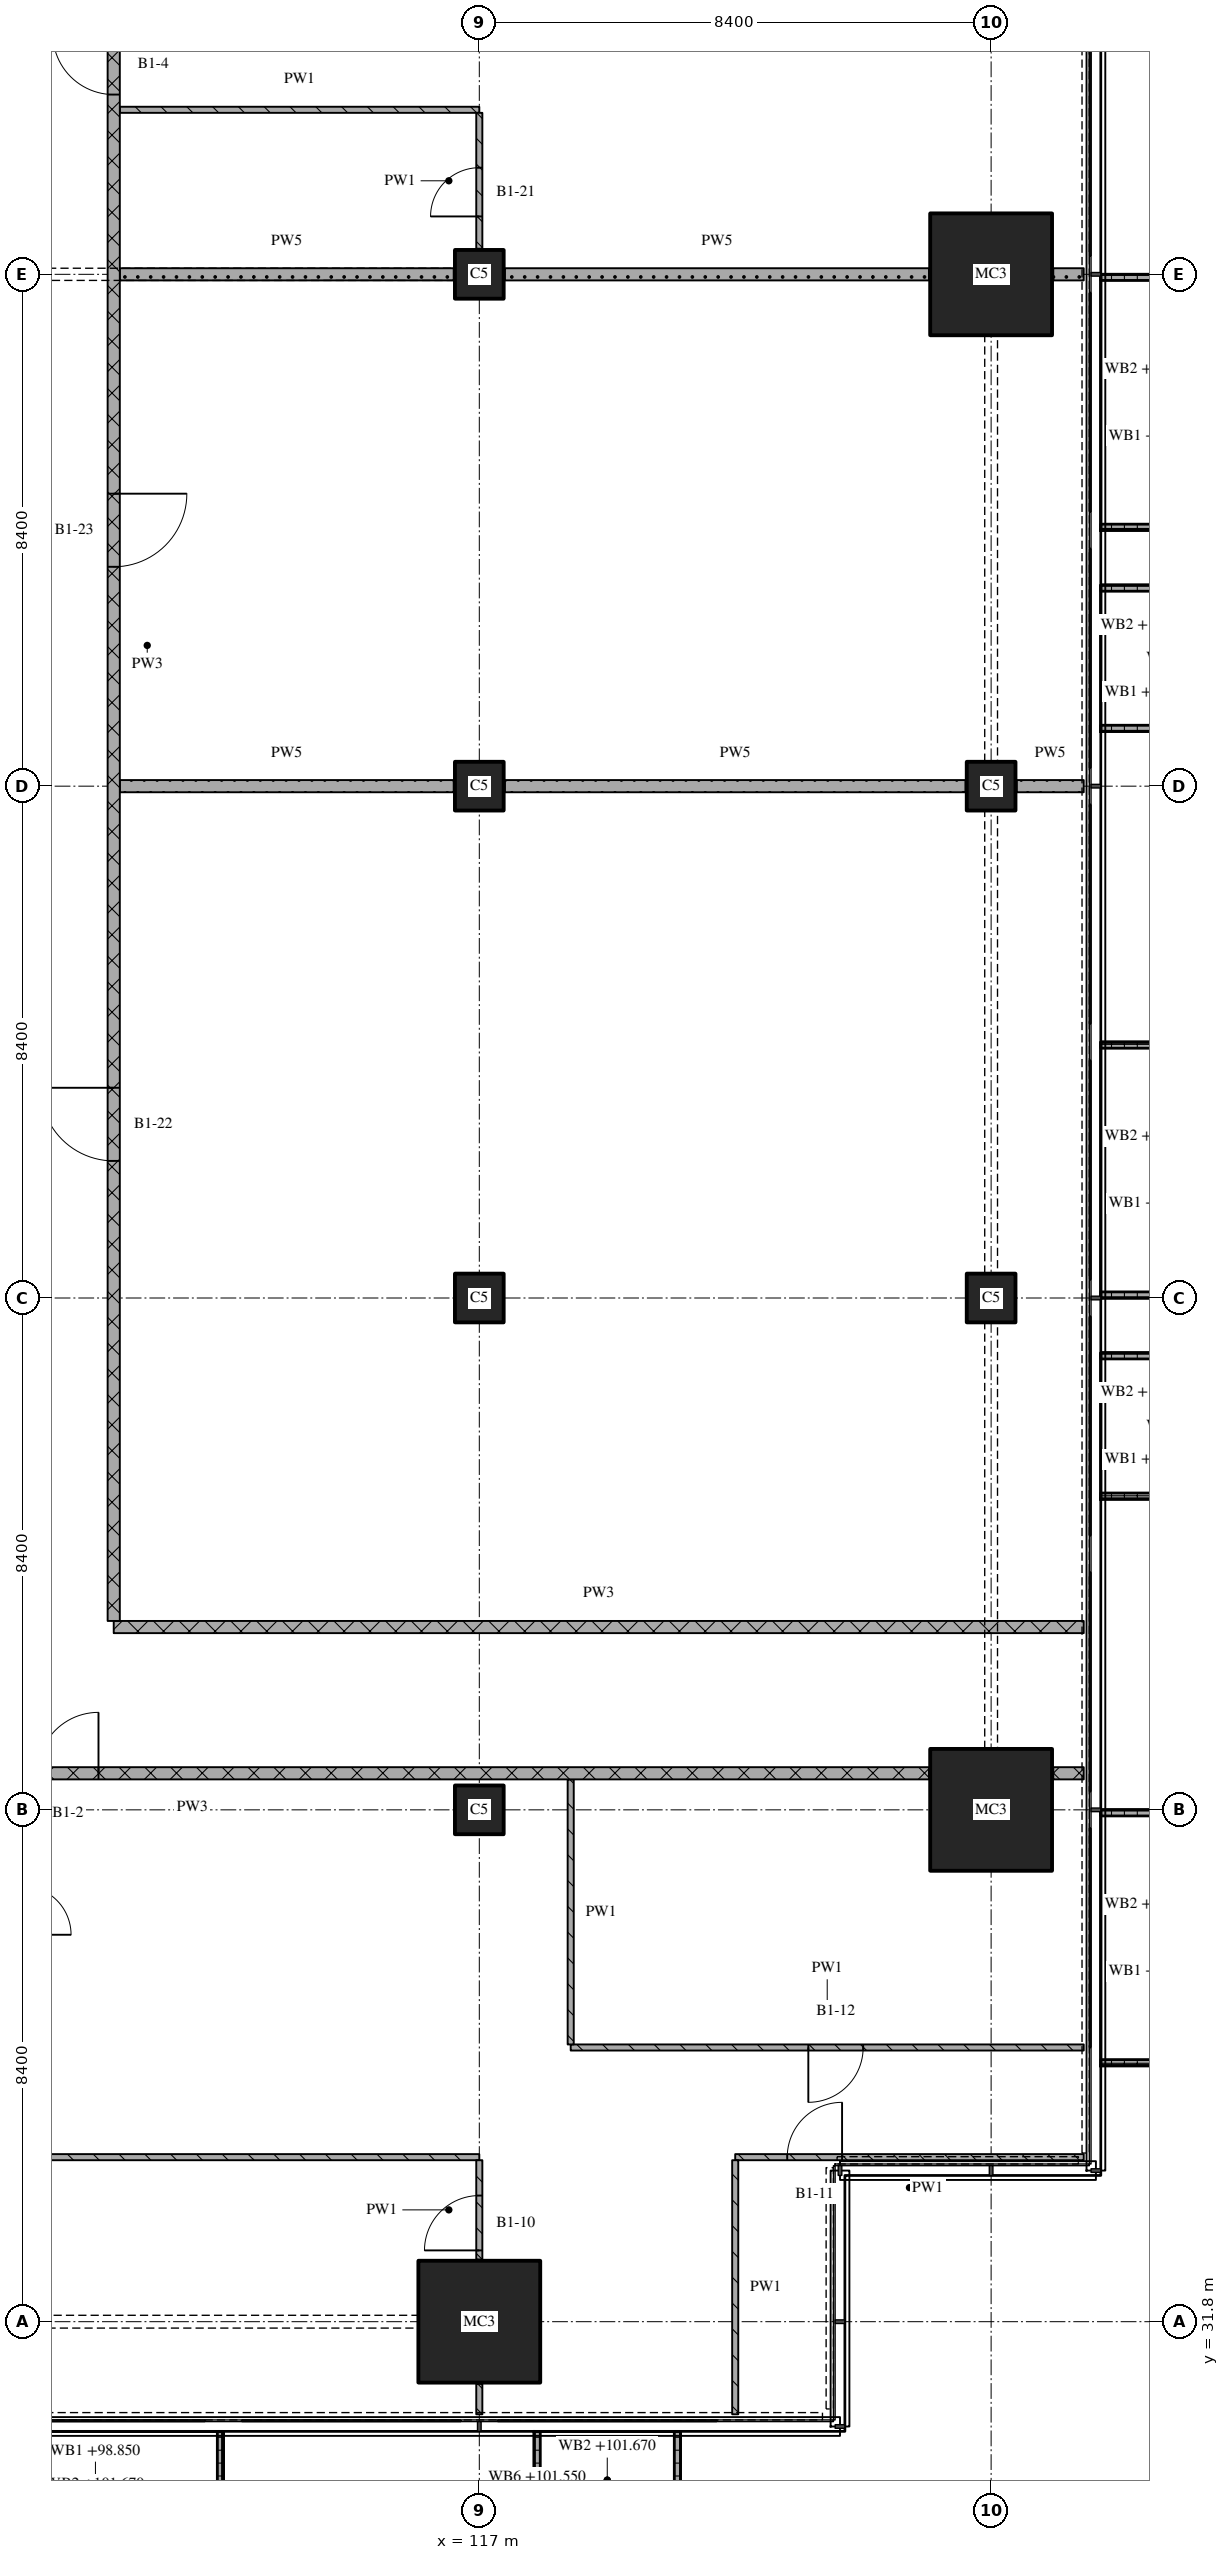
"""IFC4 building model, lengths in metres.
Left out: names, types, materials, properties, quantities, classifications, styles, units other than length and angle.
Written with IfcOpenShell. Run it as: python <this file> out.ifc"""

import sys

from ifc_helpers import new_model, si_unit, direction, frame, frame_2d, origin, origin_2d, place, context, subcontext, project, spatial, polyline, rectangle, outline, extrude, element, fill, save


model = new_model("IFC4")
c1 = context("Model", 3, precision=1e-05, world=origin(), true_north=direction((0.0, 1.0)))
c2 = subcontext(c1, "Body", "Model", "MODEL_VIEW")
j1 = project(units=[si_unit("LENGTHUNIT", "METRE"), si_unit("PLANEANGLEUNIT", "RADIAN")], contexts=[c1])
p1 = place(None, origin())
s1 = spatial("IfcSite", under=j1, at=p1, CompositionType="ELEMENT")
p2 = place(p1, origin())
s2 = spatial("IfcBuilding", under=s1, at=p2, CompositionType="ELEMENT")
p3 = place(p2, frame((0.0, 0.0, 98.85)))
s3 = spatial("IfcBuildingStorey", under=s2, at=p3, CompositionType="ELEMENT", Elevation=98.85)
p4 = place(p3, frame((117.0, 31.8, 0.0), z_axis=(0.0, 0.0, 1.0), x_axis=(1.0, 0.0, 0.0)))
e1 = element("IfcColumn", 1, at=p4, inside=s3, PredefinedType="COLUMN", context=c2, shape_type="SweptSolid", body=[
    extrude(rectangle(XDim=2.0, YDim=2.0, at=origin_2d()), origin(), (0.0, 0.0, 1.0), 3.6),
])
for number, where, z_axis, x_axis in (
    (2, (117.0, 40.2, 0.0), (0.0, 0.0, 1.0), (1.0, 0.0, 0.0)),
    (3, (117.0, 48.6, 0.0), (0.0, 0.0, 1.0), (1.0, 0.0, 0.0)),
    (4, (117.0, 57.0, 0.0), (0.0, 0.0, 1.0), (1.0, 0.0, 0.0)),
    (5, (117.0, 65.4, 0.0), (0.0, 0.0, 1.0), (1.0, 0.0, 0.0)),
):
    element("IfcColumn", number, at=place(p3, frame(where, z_axis=z_axis, x_axis=x_axis)), inside=s3, PredefinedType="COLUMN", context=c2, shape_type="SweptSolid", body=[
        extrude(rectangle(XDim=0.8, YDim=0.8, at=origin_2d()), origin(), (0.0, 0.0, 1.0), 3.6),
    ])
p5 = place(p3, frame((125.4, 40.2, 0.0), z_axis=(0.0, 0.0, 1.0), x_axis=(1.0, 0.0, 0.0)))
e6 = element("IfcColumn", 6, at=p5, inside=s3, PredefinedType="COLUMN", context=c2, shape_type="SweptSolid", body=[
    extrude(rectangle(XDim=2.0, YDim=2.0, at=origin_2d()), origin(), (0.0, 0.0, 1.0), 3.6),
])
for number, where, z_axis, x_axis in (
    (7, (125.4, 48.6, 0.0), (0.0, 0.0, 1.0), (1.0, 0.0, 0.0)),
    (8, (125.4, 57.0, 0.0), (0.0, 0.0, 1.0), (1.0, 0.0, 0.0)),
):
    element("IfcColumn", number, at=place(p3, frame(where, z_axis=z_axis, x_axis=x_axis)), inside=s3, PredefinedType="COLUMN", context=c2, shape_type="SweptSolid", body=[
        extrude(rectangle(XDim=0.8, YDim=0.8, at=origin_2d()), origin(), (0.0, 0.0, 1.0), 3.6),
    ])
p6 = place(p3, frame((125.4, 65.4, 0.0), z_axis=(0.0, 0.0, 1.0), x_axis=(1.0, 0.0, 0.0)))
e9 = element("IfcColumn", 9, at=p6, inside=s3, PredefinedType="COLUMN", context=c2, shape_type="SweptSolid", body=[
    extrude(rectangle(XDim=2.0, YDim=2.0, at=origin_2d()), origin(), (0.0, 0.0, 1.0), 3.6),
])
p7 = place(p3, origin())
e10 = element("IfcWall", 10, at=p7, inside=s3, PredefinedType="SOLIDWALL", context=c2, shape_type="SweptSolid", body=[
    extrude(outline(polyline([(108.6, 30.0), (108.7, 30.0), (108.7, 28.367), (112.7, 28.367), (112.7, 30.0), (112.8, 30.0), (112.8, 28.267), (108.6, 28.267), (108.6, 30.0)])), origin(), (0.0, 0.0, 1.0), 1.0),
])
p8 = place(p3, origin())
e11 = element("IfcWall", 11, at=p8, inside=s3, PredefinedType="SOLIDWALL", context=c2, shape_type="SweptSolid", body=[
    extrude(outline(polyline([(117.9, 30.0), (118.0, 30.0), (118.0, 28.5), (120.2, 28.5), (120.2, 30.0), (120.3, 30.0), (120.3, 28.4), (117.9, 28.4), (117.9, 30.0)])), origin(), (0.0, 0.0, 1.0), 1.0),
])
p9 = place(p3, origin())
e12 = element("IfcWall", 12, at=p9, inside=s3, PredefinedType="SOLIDWALL", context=c2, shape_type="SweptSolid", body=[
    extrude(outline(polyline([(127.2, 36.0), (127.2, 36.1), (128.833, 36.1), (128.833, 40.1), (127.2, 40.1), (127.2, 40.2), (128.933, 40.2), (128.933, 36.0), (127.2, 36.0)])), origin(), (0.0, 0.0, 1.0), 1.0),
])
p10 = place(p3, origin())
e13 = element("IfcWall", 13, at=p10, inside=s3, PredefinedType="SOLIDWALL", context=c2, shape_type="SweptSolid", body=[
    extrude(outline(polyline([(127.2, 45.3), (127.2, 45.4), (128.7, 45.4), (128.7, 47.6), (127.2, 47.6), (127.2, 47.7), (128.8, 47.7), (128.8, 45.3), (127.2, 45.3)])), origin(), (0.0, 0.0, 1.0), 1.0),
])
p11 = place(p3, origin())
e14 = element("IfcWall", 14, at=p11, inside=s3, PredefinedType="SOLIDWALL", context=c2, shape_type="SweptSolid", body=[
    extrude(outline(polyline([(127.2, 48.6), (127.2, 48.7), (128.833, 48.7), (128.833, 52.7), (127.2, 52.7), (127.2, 52.8), (128.933, 52.8), (128.933, 48.6), (127.2, 48.6)])), origin(), (0.0, 0.0, 1.0), 1.0),
])
p12 = place(p3, origin())
e15 = element("IfcWall", 15, at=p12, inside=s3, PredefinedType="SOLIDWALL", context=c2, shape_type="SweptSolid", body=[
    extrude(outline(polyline([(127.2, 57.9), (127.2, 58.0), (128.7, 58.0), (128.7, 60.2), (127.2, 60.2), (127.2, 60.3), (128.8, 60.3), (128.8, 57.9), (127.2, 57.9)])), origin(), (0.0, 0.0, 1.0), 1.0),
])
p13 = place(p3, origin())
e16 = element("IfcWall", 16, at=p13, inside=s3, PredefinedType="SOLIDWALL", context=c2, shape_type="SweptSolid", body=[
    extrude(outline(polyline([(127.2, 61.2), (127.2, 61.3), (128.833, 61.3), (128.833, 65.3), (127.2, 65.3), (127.2, 65.4), (128.933, 65.4), (128.933, 61.2), (127.2, 61.2)])), origin(), (0.0, 0.0, 1.0), 1.0),
])
p14 = place(p3, frame((117.0, 34.5, 0.0), z_axis=(0.0, 0.0, 1.0), x_axis=(-1.0, 0.0, 0.0)))
e17 = element("IfcWall", 17, at=p14, inside=s3, PredefinedType="PARTITIONING", context=c2, shape_type="SweptSolid", body=[
    extrude(rectangle(XDim=16.7, YDim=0.1, at=frame_2d((8.35, 0.0))), origin(), (0.0, 0.0, 1.0), 3.32),
])
p15 = place(p14, frame((12.15, 0.0, 0.0)))
e18 = element("IfcOpeningElement", 18, at=p15, cuts=e17, PredefinedType="OPENING", context=c2, shape_type="SweptSolid", body=[
    extrude(rectangle(XDim=0.9, YDim=2.1, at=frame_2d((0.45, 1.05))), frame((0.0, 0.06, 0.0), z_axis=(0.0, -1.0, 0.0), x_axis=(1.0, 0.0, 0.0)), (0.0, 0.0, 1.0), 0.12),
])
p16 = place(p3, frame((126.92, 34.5, 0.0), z_axis=(0.0, 0.0, 1.0), x_axis=(-1.0, 0.0, 0.0)))
e19 = element("IfcWall", 19, at=p16, inside=s3, PredefinedType="PARTITIONING", context=c2, shape_type="SweptSolid", body=[
    extrude(rectangle(XDim=5.72, YDim=0.1, at=frame_2d((2.86, 0.0))), origin(), (0.0, 0.0, 1.0), 3.32),
])
p17 = place(p16, frame((3.966, 0.0, 0.0)))
e20 = element("IfcOpeningElement", 20, at=p17, cuts=e19, PredefinedType="OPENING", context=c2, shape_type="SweptSolid", body=[
    extrude(rectangle(XDim=0.9, YDim=2.1, at=frame_2d((0.45, 1.05))), frame((0.0, 0.06, 0.0), z_axis=(0.0, -1.0, 0.0), x_axis=(1.0, 0.0, 0.0)), (0.0, 0.0, 1.0), 0.12),
])
p18 = place(p3, frame((118.5, 36.3, 0.0), z_axis=(0.0, 0.0, 1.0), x_axis=(1.0, 0.0, 0.0)))
e21 = element("IfcWall", 21, at=p18, inside=s3, PredefinedType="PARTITIONING", context=c2, shape_type="SweptSolid", body=[
    extrude(rectangle(XDim=8.42, YDim=0.1, at=frame_2d((4.21, 0.0))), origin(), (0.0, 0.0, 1.0), 3.32),
])
p19 = place(p18, frame((3.9, 0.0, 0.0)))
e22 = element("IfcOpeningElement", 22, at=p19, cuts=e21, PredefinedType="OPENING", context=c2, shape_type="SweptSolid", body=[
    extrude(rectangle(XDim=0.9, YDim=2.1, at=frame_2d((0.45, 1.05))), frame((0.0, 0.06, 0.0), z_axis=(0.0, -1.0, 0.0), x_axis=(1.0, 0.0, 0.0)), (0.0, 0.0, 1.0), 0.12),
])
p20 = place(p3, frame((124.38, 40.8, 0.0), z_axis=(0.0, 0.0, 1.0), x_axis=(-1.0, 0.0, 0.0)))
e23 = element("IfcWall", 23, at=p20, inside=s3, PredefinedType="PARTITIONING", context=c2, shape_type="SweptSolid", body=[
    extrude(rectangle(XDim=24.18, YDim=0.2, at=frame_2d((12.09, 0.0))), origin(), (0.0, 0.0, 1.0), 3.32),
])
p21 = place(p20, frame((13.63, 0.0, 0.0)))
e24 = element("IfcOpeningElement", 24, at=p21, cuts=e23, PredefinedType="OPENING", context=c2, shape_type="SweptSolid", body=[
    extrude(rectangle(XDim=1.0, YDim=2.1, at=frame_2d((0.5, 1.05))), frame((0.0, 0.11, 0.0), z_axis=(0.0, -1.0, 0.0), x_axis=(1.0, 0.0, 0.0)), (0.0, 0.0, 1.0), 0.22),
])
p22 = place(p3, frame((126.42, 40.8, 0.0), z_axis=(0.0, 0.0, 1.0), x_axis=(1.0, 0.0, 0.0)))
e25 = element("IfcWall", 25, at=p22, inside=s3, PredefinedType="PARTITIONING", context=c2, shape_type="SweptSolid", body=[
    extrude(rectangle(XDim=0.5, YDim=0.2, at=frame_2d((0.25, 0.0))), origin(), (0.0, 0.0, 1.0), 3.32),
])
p23 = place(p3, frame((111.0, 43.2, 0.0), z_axis=(0.0, 0.0, 1.0), x_axis=(1.0, 0.0, 0.0)))
e26 = element("IfcWall", 26, at=p23, inside=s3, PredefinedType="PARTITIONING", context=c2, shape_type="SweptSolid", body=[
    extrude(rectangle(XDim=15.92, YDim=0.2, at=frame_2d((7.96, 0.0))), origin(), (0.0, 0.0, 1.0), 3.32),
])
p24 = place(p3, frame((111.1, 57.0, 0.0), z_axis=(0.0, 0.0, 1.0), x_axis=(1.0, 0.0, 0.0)))
e27 = element("IfcWall", 27, at=p24, inside=s3, PredefinedType="PARTITIONING", context=c2, shape_type="SweptSolid", body=[
    extrude(rectangle(XDim=5.48, YDim=0.2, at=frame_2d((2.74, 0.0))), origin(), (0.0, 0.0, 1.0), 3.32),
])
p25 = place(p3, frame((117.42, 57.0, 0.0), z_axis=(0.0, 0.0, 1.0), x_axis=(1.0, 0.0, 0.0)))
e28 = element("IfcWall", 28, at=p25, inside=s3, PredefinedType="PARTITIONING", context=c2, shape_type="SweptSolid", body=[
    extrude(rectangle(XDim=7.56, YDim=0.2, at=frame_2d((3.78, 0.0))), origin(), (0.0, 0.0, 1.0), 3.32),
])
p26 = place(p3, frame((125.82, 57.0, 0.0), z_axis=(0.0, 0.0, 1.0), x_axis=(1.0, 0.0, 0.0)))
e29 = element("IfcWall", 29, at=p26, inside=s3, PredefinedType="PARTITIONING", context=c2, shape_type="SweptSolid", body=[
    extrude(rectangle(XDim=1.1, YDim=0.2, at=frame_2d((0.55, 0.0))), origin(), (0.0, 0.0, 1.0), 3.32),
])
p27 = place(p3, frame((111.1, 65.4, 0.0), z_axis=(0.0, 0.0, 1.0), x_axis=(1.0, 0.0, 0.0)))
e30 = element("IfcWall", 30, at=p27, inside=s3, PredefinedType="PARTITIONING", context=c2, shape_type="SweptSolid", body=[
    extrude(rectangle(XDim=5.48, YDim=0.2, at=frame_2d((2.74, 0.0))), origin(), (0.0, 0.0, 1.0), 2.82),
])
p28 = place(p3, frame((117.42, 65.4, 0.0), z_axis=(0.0, 0.0, 1.0), x_axis=(1.0, 0.0, 0.0)))
e31 = element("IfcWall", 31, at=p28, inside=s3, PredefinedType="PARTITIONING", context=c2, shape_type="SweptSolid", body=[
    extrude(rectangle(XDim=6.96, YDim=0.2, at=frame_2d((3.48, 0.0))), origin(), (0.0, 0.0, 1.0), 3.32),
])
p29 = place(p3, frame((126.42, 65.4, 0.0), z_axis=(0.0, 0.0, 1.0), x_axis=(1.0, 0.0, 0.0)))
e32 = element("IfcWall", 32, at=p29, inside=s3, PredefinedType="PARTITIONING", context=c2, shape_type="SweptSolid", body=[
    extrude(rectangle(XDim=0.5, YDim=0.2, at=frame_2d((0.25, 0.0))), origin(), (0.0, 0.0, 1.0), 3.32),
])
p30 = place(p3, frame((111.1, 68.1, 0.0), z_axis=(0.0, 0.0, 1.0), x_axis=(1.0, 0.0, 0.0)))
e33 = element("IfcWall", 33, at=p30, inside=s3, PredefinedType="PARTITIONING", context=c2, shape_type="SweptSolid", body=[
    extrude(rectangle(XDim=5.9, YDim=0.1, at=frame_2d((2.95, 0.0))), origin(), (0.0, 0.0, 1.0), 3.32),
])
p31 = place(p3, frame((111.0, 75.32, 0.0), z_axis=(0.0, 0.0, 1.0), x_axis=(0.0, -1.0, 0.0)))
e34 = element("IfcWall", 34, at=p31, inside=s3, PredefinedType="PARTITIONING", context=c2, shape_type="SweptSolid", body=[
    extrude(rectangle(XDim=32.02, YDim=0.2, at=frame_2d((16.01, 0.0))), origin(), (0.0, 0.0, 1.0), 3.32),
])
p32 = place(p31, frame((5.97, 0.0, 0.0)))
e35 = element("IfcOpeningElement", 35, at=p32, cuts=e34, PredefinedType="OPENING", context=c2, shape_type="SweptSolid", body=[
    extrude(rectangle(XDim=1.0, YDim=2.1, at=frame_2d((0.5, 1.05))), frame((0.0, 0.11, 0.0), z_axis=(0.0, -1.0, 0.0), x_axis=(1.0, 0.0, 0.0)), (0.0, 0.0, 1.0), 0.22),
])
p33 = place(p31, frame((13.52, 0.0, 0.0)))
e36 = element("IfcOpeningElement", 36, at=p33, cuts=e34, PredefinedType="OPENING", context=c2, shape_type="SweptSolid", body=[
    extrude(rectangle(XDim=1.2, YDim=2.1, at=frame_2d((0.6, 1.05))), frame((0.0, 0.11, 0.0), z_axis=(0.0, -1.0, 0.0), x_axis=(1.0, 0.0, 0.0)), (0.0, 0.0, 1.0), 0.22),
])
p34 = place(p31, frame((23.27, 0.0, 0.0)))
e37 = element("IfcOpeningElement", 37, at=p34, cuts=e34, PredefinedType="OPENING", context=c2, shape_type="SweptSolid", body=[
    extrude(rectangle(XDim=1.2, YDim=2.1, at=frame_2d((0.6, 1.05))), frame((0.0, 0.11, 0.0), z_axis=(0.0, -1.0, 0.0), x_axis=(1.0, 0.0, 0.0)), (0.0, 0.0, 1.0), 0.22),
])
p35 = place(p3, frame((117.0, 30.78, 0.0), z_axis=(0.0, 0.0, 1.0), x_axis=(0.0, -1.0, 0.0)))
e38 = element("IfcWall", 38, at=p35, inside=s3, PredefinedType="PARTITIONING", context=c2, shape_type="SweptSolid", body=[
    extrude(rectangle(XDim=0.5, YDim=0.1, at=frame_2d((0.25, 0.0))), origin(), (0.0, 0.0, 1.0), 3.32),
])
p36 = place(p3, frame((117.0, 32.82, 0.0), z_axis=(0.0, 0.0, 1.0), x_axis=(0.0, 1.0, 0.0)))
e39 = element("IfcWall", 39, at=p36, inside=s3, PredefinedType="PARTITIONING", context=c2, shape_type="SweptSolid", body=[
    extrude(rectangle(XDim=1.63, YDim=0.1, at=frame_2d((0.815, 0.0))), origin(), (0.0, 0.0, 1.0), 3.32),
])
p37 = place(p36, frame((0.15, 0.0, 0.0)))
e40 = element("IfcOpeningElement", 40, at=p37, cuts=e39, PredefinedType="OPENING", context=c2, shape_type="SweptSolid", body=[
    extrude(rectangle(XDim=0.9, YDim=2.1, at=frame_2d((0.45, 1.05))), frame((0.0, 0.06, 0.0), z_axis=(0.0, -1.0, 0.0), x_axis=(1.0, 0.0, 0.0)), (0.0, 0.0, 1.0), 0.12),
])
p38 = place(p3, frame((117.0, 65.82, 0.0), z_axis=(0.0, 0.0, 1.0), x_axis=(0.0, 1.0, 0.0)))
e41 = element("IfcWall", 41, at=p38, inside=s3, PredefinedType="PARTITIONING", context=c2, shape_type="SweptSolid", body=[
    extrude(rectangle(XDim=2.23, YDim=0.1, at=frame_2d((1.115, 0.0))), origin(), (0.0, 0.0, 1.0), 3.32),
])
p39 = place(p38, frame((0.53, 0.0, 0.0)))
e42 = element("IfcOpeningElement", 42, at=p39, cuts=e41, PredefinedType="OPENING", context=c2, shape_type="SweptSolid", body=[
    extrude(rectangle(XDim=0.8, YDim=2.1, at=frame_2d((0.4, 1.05))), frame((0.0, 0.06, 0.0), z_axis=(0.0, -1.0, 0.0), x_axis=(1.0, 0.0, 0.0)), (0.0, 0.0, 1.0), 0.12),
])
p40 = place(p3, frame((118.5, 40.7, 0.0), z_axis=(0.0, 0.0, 1.0), x_axis=(0.0, -1.0, 0.0)))
e43 = element("IfcWall", 43, at=p40, inside=s3, PredefinedType="PARTITIONING", context=c2, shape_type="SweptSolid", body=[
    extrude(rectangle(XDim=4.35, YDim=0.1, at=frame_2d((2.175, 0.0))), origin(), (0.0, 0.0, 1.0), 3.32),
])
p41 = place(p3, frame((121.2, 34.45, 0.0), z_axis=(0.0, 0.0, 1.0), x_axis=(0.0, -1.0, 0.0)))
e44 = element("IfcWall", 44, at=p41, inside=s3, PredefinedType="PARTITIONING", context=c2, shape_type="SweptSolid", body=[
    extrude(rectangle(XDim=4.17, YDim=0.1, at=frame_2d((2.085, 0.0))), origin(), (0.0, 0.0, 1.0), 3.32),
])
p42 = place(p17, origin())
e45 = element("IfcDoor", 45, at=p42, inside=s3, OperationType="SINGLE_SWING_RIGHT", PredefinedType="DOOR", context=c2, shape_type="SweptSolid", body=[
    extrude(rectangle(XDim=0.9, YDim=2.1, at=frame_2d((0.45, 1.05))), frame((0.0, 0.025, 0.0), z_axis=(0.0, -1.0, 0.0), x_axis=(1.0, 0.0, 0.0)), (0.0, 0.0, 1.0), 0.05),
])
fill(e20, e45)
p43 = place(p19, origin())
e46 = element("IfcDoor", 46, at=p43, inside=s3, OperationType="SINGLE_SWING_RIGHT", PredefinedType="DOOR", context=c2, shape_type="SweptSolid", body=[
    extrude(rectangle(XDim=0.9, YDim=2.1, at=frame_2d((0.45, 1.05))), frame((0.0, 0.025, 0.0), z_axis=(0.0, -1.0, 0.0), x_axis=(1.0, 0.0, 0.0)), (0.0, 0.0, 1.0), 0.05),
])
fill(e22, e46)
p44 = place(p21, origin())
e47 = element("IfcDoor", 47, at=p44, inside=s3, OperationType="SINGLE_SWING_RIGHT", PredefinedType="DOOR", context=c2, shape_type="SweptSolid", body=[
    extrude(rectangle(XDim=1.0, YDim=2.1, at=frame_2d((0.5, 1.05))), frame((0.0, 0.025, 0.0), z_axis=(0.0, -1.0, 0.0), x_axis=(1.0, 0.0, 0.0)), (0.0, 0.0, 1.0), 0.05),
])
fill(e24, e47)
p45 = place(p32, origin())
e48 = element("IfcDoor", 48, at=p45, inside=s3, OperationType="SINGLE_SWING_RIGHT", PredefinedType="DOOR", context=c2, shape_type="SweptSolid", body=[
    extrude(rectangle(XDim=1.0, YDim=2.1, at=frame_2d((0.5, 1.05))), frame((0.0, 0.025, 0.0), z_axis=(0.0, -1.0, 0.0), x_axis=(1.0, 0.0, 0.0)), (0.0, 0.0, 1.0), 0.05),
])
fill(e35, e48)
p46 = place(p33, origin())
e49 = element("IfcDoor", 49, at=p46, inside=s3, OperationType="SINGLE_SWING_LEFT", PredefinedType="DOOR", context=c2, shape_type="SweptSolid", body=[
    extrude(rectangle(XDim=1.2, YDim=2.1, at=frame_2d((0.6, 1.05))), frame((0.0, 0.025, 0.0), z_axis=(0.0, -1.0, 0.0), x_axis=(1.0, 0.0, 0.0)), (0.0, 0.0, 1.0), 0.05),
])
fill(e36, e49)
p47 = place(p34, origin())
e50 = element("IfcDoor", 50, at=p47, inside=s3, OperationType="SINGLE_SWING_RIGHT", PredefinedType="DOOR", context=c2, shape_type="SweptSolid", body=[
    extrude(rectangle(XDim=1.2, YDim=2.1, at=frame_2d((0.6, 1.05))), frame((0.0, 0.025, 0.0), z_axis=(0.0, -1.0, 0.0), x_axis=(1.0, 0.0, 0.0)), (0.0, 0.0, 1.0), 0.05),
])
fill(e37, e50)
p48 = place(p37, origin())
e51 = element("IfcDoor", 51, at=p48, inside=s3, OperationType="SINGLE_SWING_LEFT", PredefinedType="DOOR", context=c2, shape_type="SweptSolid", body=[
    extrude(rectangle(XDim=0.9, YDim=2.1, at=frame_2d((0.45, 1.05))), frame((0.0, 0.025, 0.0), z_axis=(0.0, -1.0, 0.0), x_axis=(1.0, 0.0, 0.0)), (0.0, 0.0, 1.0), 0.05),
])
fill(e40, e51)
p49 = place(p39, origin())
e52 = element("IfcDoor", 52, at=p49, inside=s3, OperationType="SINGLE_SWING_LEFT", PredefinedType="DOOR", context=c2, shape_type="SweptSolid", body=[
    extrude(rectangle(XDim=0.8, YDim=2.1, at=frame_2d((0.4, 1.05))), frame((0.0, 0.025, 0.0), z_axis=(0.0, -1.0, 0.0), x_axis=(1.0, 0.0, 0.0)), (0.0, 0.0, 1.0), 0.05),
])
fill(e42, e52)
save(model, sys.argv[1])
